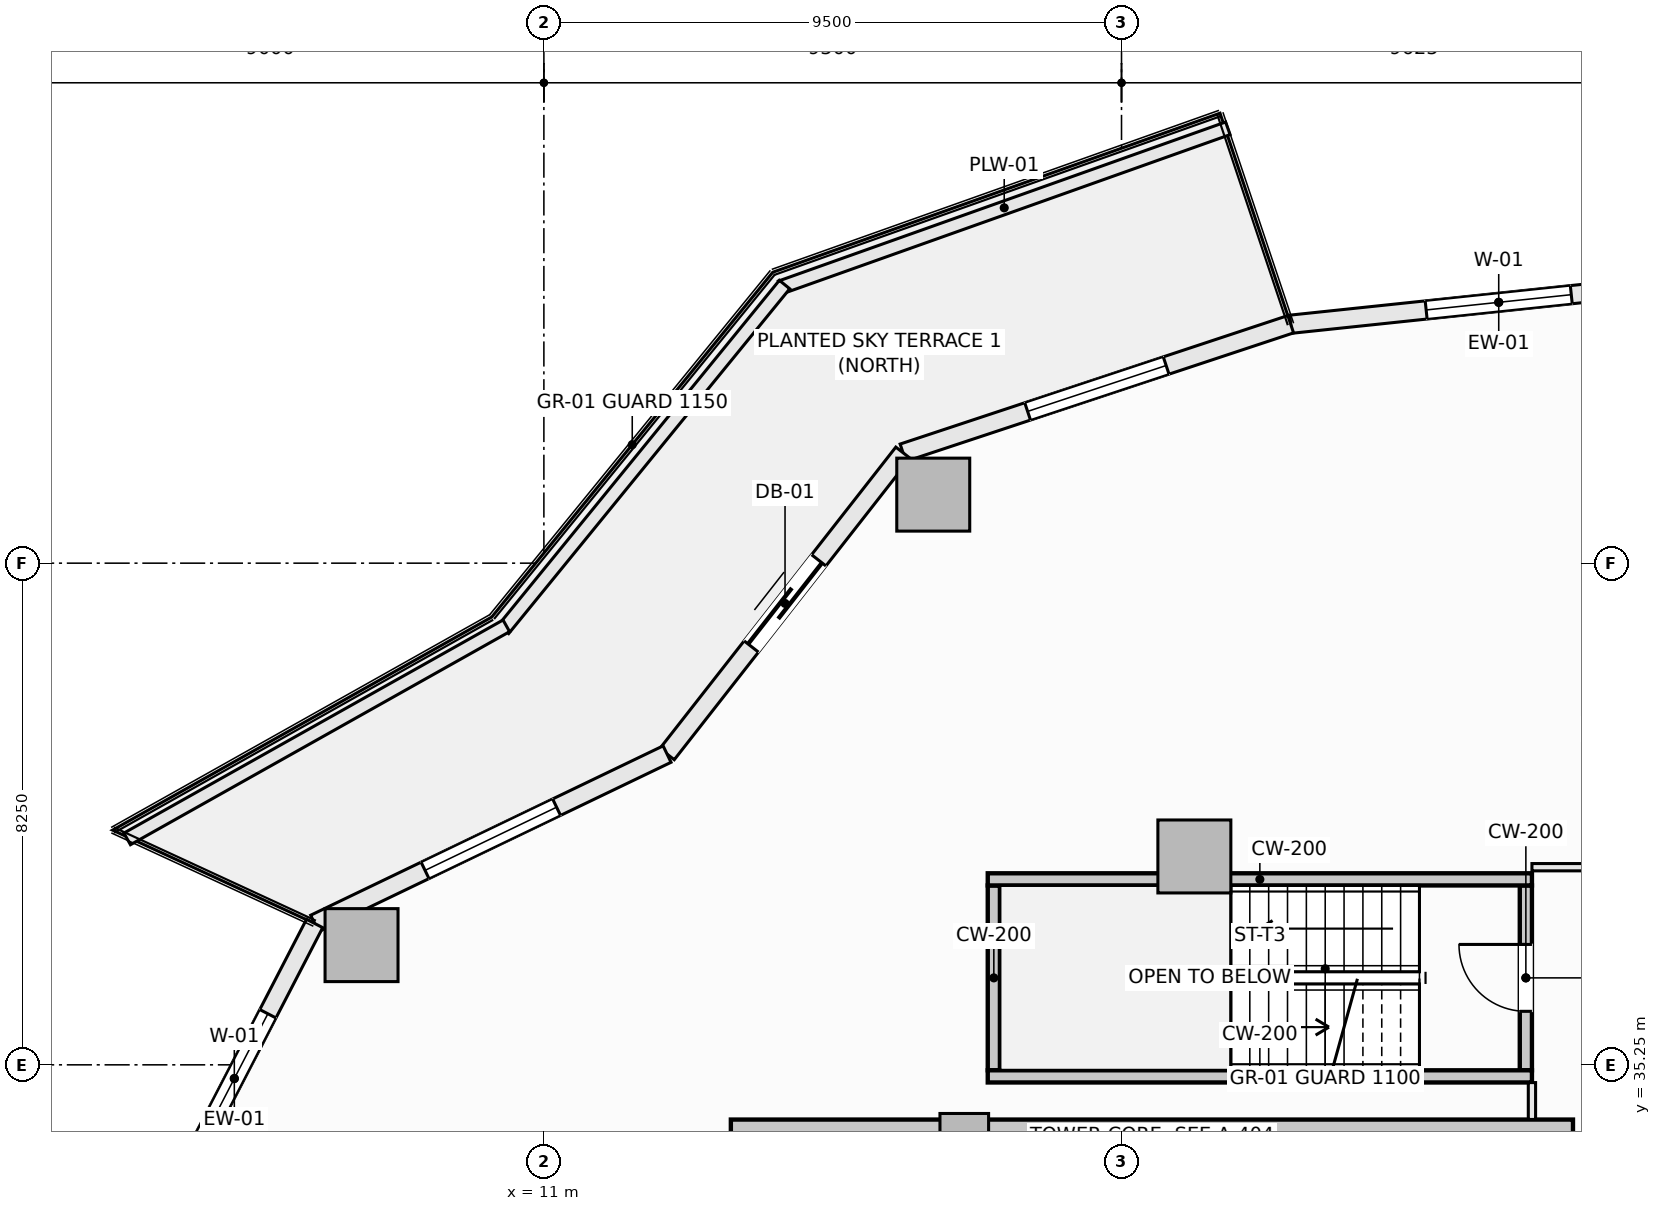
"""IFC4 building model, lengths in metres.
Left out: names, types, materials, properties, quantities, classifications, styles, units other than length and angle.
Written with IfcOpenShell. Run it as: python <this file> out.ifc"""

import sys

from ifc_helpers import new_model, si_unit, direction, frame, frame_2d, origin, origin_2d, place, context, subcontext, project, spatial, rectangle, extrude, element, fill, save


model = new_model("IFC4")
c1 = context("Model", 3, precision=1e-05, world=origin(), true_north=direction((0.0, 1.0)))
c2 = subcontext(c1, "Body", "Model", "MODEL_VIEW")
j1 = project(units=[si_unit("LENGTHUNIT", "METRE"), si_unit("PLANEANGLEUNIT", "RADIAN")], contexts=[c1])
p1 = place(None, origin())
s1 = spatial("IfcSite", under=j1, at=p1, CompositionType="ELEMENT")
p2 = place(p1, origin())
s2 = spatial("IfcBuilding", under=s1, at=p2, CompositionType="ELEMENT")
p3 = place(p2, frame((0.0, 0.0, 68.85)))
s3 = spatial("IfcBuildingStorey", under=s2, at=p3, CompositionType="ELEMENT", Elevation=68.85)
p4 = place(p3, frame((14.075, 33.925, -0.28), z_axis=(0.0, 0.0, 1.0), x_axis=(1.0, 0.0, 0.0)))
e1 = element("IfcWall", 1, at=p4, inside=s3, PredefinedType="SHEAR", context=c2, shape_type="SweptSolid", body=[
    extrude(rectangle(XDim=13.85, YDim=0.85, at=frame_2d((6.925, 0.0))), origin(), (0.0, 0.0, 1.0), 3.85),
])
for number, where, z_axis, x_axis in (
    (2, (17.404, 44.627, -0.28), (0.0, 0.0, 1.0), (1.0, 0.0, 0.0)),
    (3, (8.001, 37.219, -0.28), (0.0, 0.0, 1.0), (1.0, 0.0, 0.0)),
    (4, (21.698, 38.677, -0.28), (0.0, 0.0, 1.0), (1.0, 0.0, 0.0)),
):
    element("IfcColumn", number, at=place(p3, frame(where, z_axis=z_axis, x_axis=x_axis)), inside=s3, PredefinedType="COLUMN", context=c2, shape_type="SweptSolid", body=[
        extrude(rectangle(XDim=1.2, YDim=1.2, at=origin_2d()), origin(), (0.0, 0.0, 1.0), 3.85),
    ])
p5 = place(p3, frame((17.914, 34.05, -0.28), z_axis=(0.0, 0.0, 1.0), x_axis=(1.0, 0.0, 0.0)))
e5 = element("IfcColumn", 5, at=p5, inside=s3, PredefinedType="PILASTER", context=c2, shape_type="SweptSolid", body=[
    extrude(rectangle(XDim=0.8, YDim=0.8, at=origin_2d()), origin(), (0.0, 0.0, 1.0), 3.85),
])
p6 = place(p3, frame((23.282, 47.429, 0.0), z_axis=(0.0, 0.0, 1.0), x_axis=(0.994498840295, 0.104747585419, 0.0)))
e6 = element("IfcWall", 6, at=p6, inside=s3, PredefinedType="SOLIDWALL", context=c2, shape_type="SweptSolid", body=[
    extrude(rectangle(XDim=6.88, YDim=0.3, at=frame_2d((3.44, 0.0))), origin(), (0.0, 0.0, 1.0), 3.093),
])
p7 = place(p6, frame((2.24, 0.0, 0.85)))
e7 = element("IfcOpeningElement", 7, at=p7, cuts=e6, PredefinedType="OPENING", context=c2, shape_type="SweptSolid", body=[
    extrude(rectangle(XDim=2.4, YDim=1.9, at=frame_2d((1.2, 0.95))), frame((0.0, 0.16, 0.0), z_axis=(0.0, -1.0, 0.0), x_axis=(1.0, 0.0, 0.0)), (0.0, 0.0, 1.0), 0.32),
])
p8 = place(p3, frame((16.906, 45.316, 0.0), z_axis=(0.0, 0.0, 1.0), x_axis=(0.949245153629, 0.314537181127, 0.0)))
e8 = element("IfcWall", 8, at=p8, inside=s3, PredefinedType="SOLIDWALL", context=c2, shape_type="SweptSolid", body=[
    extrude(rectangle(XDim=6.717, YDim=0.3, at=frame_2d((3.358, 0.0))), origin(), (0.0, 0.0, 1.0), 3.093),
])
p9 = place(p8, frame((2.159, 0.0, 0.85)))
e9 = element("IfcOpeningElement", 9, at=p9, cuts=e8, PredefinedType="OPENING", context=c2, shape_type="SweptSolid", body=[
    extrude(rectangle(XDim=2.4, YDim=1.9, at=frame_2d((1.2, 0.95))), frame((0.0, 0.16, 0.0), z_axis=(0.0, -1.0, 0.0), x_axis=(1.0, 0.0, 0.0)), (0.0, 0.0, 1.0), 0.32),
])
p10 = place(p3, frame((13.026, 40.36, 0.0), z_axis=(0.0, 0.0, 1.0), x_axis=(0.616434798832, 0.78740595552, 0.0)))
e10 = element("IfcWall", 10, at=p10, inside=s3, PredefinedType="SOLIDWALL", context=c2, shape_type="SweptSolid", body=[
    extrude(rectangle(XDim=6.294, YDim=0.3, at=frame_2d((3.147, 0.0))), origin(), (0.0, 0.0, 1.0), 3.093),
])
p11 = place(p10, frame((2.247, 0.0, 0.0)))
e11 = element("IfcOpeningElement", 11, at=p11, cuts=e10, PredefinedType="OPENING", context=c2, shape_type="SweptSolid", body=[
    extrude(rectangle(XDim=1.8, YDim=2.25, at=frame_2d((0.9, 1.125))), frame((0.0, 0.16, 0.0), z_axis=(0.0, -1.0, 0.0), x_axis=(1.0, 0.0, 0.0)), (0.0, 0.0, 1.0), 0.32),
])
p12 = place(p3, frame((7.229, 37.575, 0.0), z_axis=(0.0, 0.0, 1.0), x_axis=(0.901354747727, 0.433081538224, 0.0)))
e12 = element("IfcWall", 12, at=p12, inside=s3, PredefinedType="SOLIDWALL", context=c2, shape_type="SweptSolid", body=[
    extrude(rectangle(XDim=6.431, YDim=0.3, at=frame_2d((3.215, 0.0))), origin(), (0.0, 0.0, 1.0), 3.093),
])
p13 = place(p12, frame((2.015, 0.0, 0.85)))
e13 = element("IfcOpeningElement", 13, at=p13, cuts=e12, PredefinedType="OPENING", context=c2, shape_type="SweptSolid", body=[
    extrude(rectangle(XDim=2.4, YDim=1.9, at=frame_2d((1.2, 0.95))), frame((0.0, 0.16, 0.0), z_axis=(0.0, -1.0, 0.0), x_axis=(1.0, 0.0, 0.0)), (0.0, 0.0, 1.0), 0.32),
])
p14 = place(p3, frame((4.588, 32.474, 0.0), z_axis=(0.0, 0.0, 1.0), x_axis=(0.459800981414, 0.888021991558, 0.0)))
e14 = element("IfcWall", 14, at=p14, inside=s3, PredefinedType="SOLIDWALL", context=c2, shape_type="SweptSolid", body=[
    extrude(rectangle(XDim=5.744, YDim=0.3, at=frame_2d((2.872, 0.0))), origin(), (0.0, 0.0, 1.0), 3.093),
])
p15 = place(p14, frame((1.672, 0.0, 0.85)))
e15 = element("IfcOpeningElement", 15, at=p15, cuts=e14, PredefinedType="OPENING", context=c2, shape_type="SweptSolid", body=[
    extrude(rectangle(XDim=2.4, YDim=1.9, at=frame_2d((1.2, 0.95))), frame((0.0, 0.16, 0.0), z_axis=(0.0, -1.0, 0.0), x_axis=(1.0, 0.0, 0.0)), (0.0, 0.0, 1.0), 0.32),
])
p16 = place(p3, frame((14.893, 48.035, 0.0), z_axis=(0.0, 0.0, 1.0), x_axis=(0.942200211781, 0.335050385643, 0.0)))
e16 = element("IfcWall", 16, at=p16, inside=s3, PredefinedType="PARAPET", context=c2, shape_type="SweptSolid", body=[
    extrude(rectangle(XDim=7.807, YDim=0.22, at=frame_2d((3.903, 0.0))), origin(), (0.0, 0.0, 1.0), 0.52),
])
p17 = place(p3, frame((10.336, 42.411, 0.0), z_axis=(0.0, 0.0, 1.0), x_axis=(0.631819273026, 0.775115737315, 0.0)))
e17 = element("IfcWall", 17, at=p17, inside=s3, PredefinedType="PARAPET", context=c2, shape_type="SweptSolid", body=[
    extrude(rectangle(XDim=7.316, YDim=0.22, at=frame_2d((3.658, 0.0))), origin(), (0.0, 0.0, 1.0), 0.52),
])
p18 = place(p3, frame((4.147, 38.966, 0.0), z_axis=(0.0, 0.0, 1.0), x_axis=(0.871775109335, 0.489906275468, 0.0)))
e18 = element("IfcWall", 18, at=p18, inside=s3, PredefinedType="PARAPET", context=c2, shape_type="SweptSolid", body=[
    extrude(rectangle(XDim=7.152, YDim=0.22, at=frame_2d((3.576, 0.0))), origin(), (0.0, 0.0, 1.0), 0.52),
])
p19 = place(p3, frame((27.15, 35.16, -0.28), z_axis=(0.0, 0.0, 1.0), x_axis=(0.0, 1.0, 0.0)))
e19 = element("IfcWall", 19, at=p19, inside=s3, PredefinedType="SHEAR", context=c2, shape_type="SweptSolid", body=[
    extrude(rectangle(XDim=3.04, YDim=0.2, at=frame_2d((1.52, 0.0))), origin(), (0.0, 0.0, 1.0), 3.85),
])
p20 = place(p19, frame((0.97, 0.0, 0.28)))
e20 = element("IfcOpeningElement", 20, at=p20, cuts=e19, PredefinedType="OPENING", context=c2, shape_type="SweptSolid", body=[
    extrude(rectangle(XDim=1.1, YDim=2.15, at=frame_2d((0.55, 1.075))), frame((0.0, 0.11, 0.0), z_axis=(0.0, -1.0, 0.0), x_axis=(1.0, 0.0, 0.0)), (0.0, 0.0, 1.0), 0.22),
])
p21 = place(p3, frame((18.4, 35.16, -0.28), z_axis=(0.0, 0.0, 1.0), x_axis=(0.0, 1.0, 0.0)))
e21 = element("IfcWall", 21, at=p21, inside=s3, PredefinedType="SHEAR", context=c2, shape_type="SweptSolid", body=[
    extrude(rectangle(XDim=3.04, YDim=0.2, at=frame_2d((1.52, 0.0))), origin(), (0.0, 0.0, 1.0), 3.85),
])
for number, where, z_axis, x_axis in (
    (22, (18.3, 38.3, -0.28), (0.0, 0.0, 1.0), (1.0, 0.0, 0.0)),
    (23, (18.3, 35.06, -0.28), (0.0, 0.0, 1.0), (1.0, 0.0, 0.0)),
):
    element("IfcWall", number, at=place(p3, frame(where, z_axis=z_axis, x_axis=x_axis)), inside=s3, PredefinedType="SHEAR", context=c2, shape_type="SweptSolid", body=[
        extrude(rectangle(XDim=8.95, YDim=0.2, at=frame_2d((4.475, 0.0))), origin(), (0.0, 0.0, 1.0), 3.85),
    ])
p22 = place(p3, frame((27.25, 34.352, 0.0), z_axis=(0.0, 0.0, 1.0), x_axis=(0.0, 1.0, 0.0)))
e24 = element("IfcWall", 24, at=p22, inside=s3, PredefinedType="PARTITIONING", context=c2, shape_type="SweptSolid", body=[
    extrude(rectangle(XDim=0.606, YDim=0.12, at=frame_2d((0.303, 0.0))), origin(), (0.0, 0.0, 1.0), 3.57),
])
p23 = place(p3, frame((27.25, 38.5, 0.0), z_axis=(0.0, 0.0, 1.0), x_axis=(1.0, 0.0, 0.0)))
e25 = element("IfcWall", 25, at=p23, inside=s3, PredefinedType="PARTITIONING", context=c2, shape_type="SweptSolid", body=[
    extrude(rectangle(XDim=2.53, YDim=0.12, at=frame_2d((1.265, 0.0))), origin(), (0.0, 0.0, 1.0), 3.57),
])
p24 = place(p7, origin())
e26 = element("IfcWindow", 26, at=p24, inside=s3, PartitioningType="SINGLE_PANEL", PredefinedType="WINDOW", context=c2, shape_type="SweptSolid", body=[
    extrude(rectangle(XDim=2.4, YDim=1.9, at=frame_2d((1.2, 0.95))), frame((0.0, 0.03, 0.0), z_axis=(0.0, -1.0, 0.0), x_axis=(1.0, 0.0, 0.0)), (0.0, 0.0, 1.0), 0.06),
])
fill(e7, e26)
p25 = place(p9, origin())
e27 = element("IfcWindow", 27, at=p25, inside=s3, PartitioningType="SINGLE_PANEL", PredefinedType="WINDOW", context=c2, shape_type="SweptSolid", body=[
    extrude(rectangle(XDim=2.4, YDim=1.9, at=frame_2d((1.2, 0.95))), frame((0.0, 0.03, 0.0), z_axis=(0.0, -1.0, 0.0), x_axis=(1.0, 0.0, 0.0)), (0.0, 0.0, 1.0), 0.06),
])
fill(e9, e27)
p26 = place(p11, origin())
e28 = element("IfcDoor", 28, at=p26, inside=s3, OperationType="SLIDING_TO_LEFT", PredefinedType="DOOR", context=c2, shape_type="SweptSolid", body=[
    extrude(rectangle(XDim=1.8, YDim=2.25, at=frame_2d((0.9, 1.125))), frame((0.0, 0.025, 0.0), z_axis=(0.0, -1.0, 0.0), x_axis=(1.0, 0.0, 0.0)), (0.0, 0.0, 1.0), 0.05),
])
fill(e11, e28)
p27 = place(p13, origin())
e29 = element("IfcWindow", 29, at=p27, inside=s3, PartitioningType="SINGLE_PANEL", PredefinedType="WINDOW", context=c2, shape_type="SweptSolid", body=[
    extrude(rectangle(XDim=2.4, YDim=1.9, at=frame_2d((1.2, 0.95))), frame((0.0, 0.03, 0.0), z_axis=(0.0, -1.0, 0.0), x_axis=(1.0, 0.0, 0.0)), (0.0, 0.0, 1.0), 0.06),
])
fill(e13, e29)
p28 = place(p15, origin())
e30 = element("IfcWindow", 30, at=p28, inside=s3, PartitioningType="SINGLE_PANEL", PredefinedType="WINDOW", context=c2, shape_type="SweptSolid", body=[
    extrude(rectangle(XDim=2.4, YDim=1.9, at=frame_2d((1.2, 0.95))), frame((0.0, 0.03, 0.0), z_axis=(0.0, -1.0, 0.0), x_axis=(1.0, 0.0, 0.0)), (0.0, 0.0, 1.0), 0.06),
])
fill(e15, e30)
p29 = place(p20, origin())
e31 = element("IfcDoor", 31, at=p29, inside=s3, OperationType="SINGLE_SWING_RIGHT", PredefinedType="DOOR", context=c2, shape_type="SweptSolid", body=[
    extrude(rectangle(XDim=1.1, YDim=2.15, at=frame_2d((0.55, 1.075))), frame((0.0, 0.025, 0.0), z_axis=(0.0, -1.0, 0.0), x_axis=(1.0, 0.0, 0.0)), (0.0, 0.0, 1.0), 0.05),
])
fill(e20, e31)
save(model, sys.argv[1])
